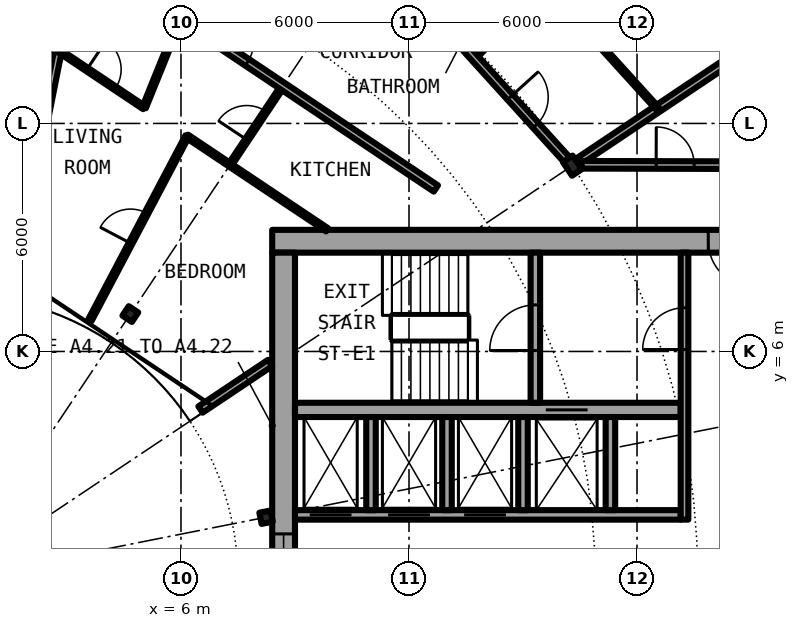
"""IFC4 building model, lengths in metres.
Left out: names, types, materials, properties, quantities, classifications, styles, units other than length and angle.
Written with IfcOpenShell. Run it as: python <this file> out.ifc"""

import sys

from ifc_helpers import new_model, si_unit, direction, frame, frame_2d, origin, origin_2d, place, context, subcontext, project, spatial, rectangle, i_section, extrude, element, fill, save


model = new_model("IFC4")
c1 = context("Model", 3, precision=1e-05, world=origin(), true_north=direction((0.0, 1.0)))
c2 = subcontext(c1, "Body", "Model", "MODEL_VIEW")
j1 = project(units=[si_unit("LENGTHUNIT", "METRE"), si_unit("PLANEANGLEUNIT", "RADIAN")], contexts=[c1])
p1 = place(None, origin())
s1 = spatial("IfcSite", under=j1, at=p1, CompositionType="ELEMENT")
p2 = place(p1, origin())
s2 = spatial("IfcBuilding", under=s1, at=p2, CompositionType="ELEMENT")
p3 = place(p2, frame((0.0, 0.0, 123.85)))
s3 = spatial("IfcBuildingStorey", under=s2, at=p3, CompositionType="ELEMENT", Elevation=123.85)
p4 = place(p3, frame((16.297, 10.889, 0.0), z_axis=(0.0, 0.0, 1.0), x_axis=(0.831469612303, 0.55557023302, 0.0)))
e1 = element("IfcColumn", 1, at=p4, inside=s3, PredefinedType="COLUMN", context=c2, shape_type="SweptSolid", body=[
    extrude(i_section(OverallWidth=0.307, OverallDepth=0.432, WebThickness=0.021, FlangeThickness=0.04, FilletRadius=0.027, at=origin_2d()), origin(), (0.0, 0.0, 1.0), 3.05),
])
for number, where, z_axis, x_axis in (
    (2, (8.239, 1.639, 0.0), (0.0, 0.0, 1.0), (0.981, 0.195, 0.0)),
    (3, (4.667, 6.984, 0.0), (0.0, 0.0, 1.0), (0.556, 0.831, 0.0)),
):
    element("IfcColumn", number, at=place(p3, frame(where, z_axis=z_axis, x_axis=x_axis)), inside=s3, PredefinedType="COLUMN", context=c2, shape_type="SweptSolid", body=[
        extrude(i_section(OverallWidth=0.3, OverallDepth=0.3, WebThickness=0.011, FlangeThickness=0.019, FilletRadius=0.027, at=origin_2d()), origin(), (0.0, 0.0, 1.0), 3.05),
    ])
p5 = place(p3, frame((22.2, 8.9, 0.0), z_axis=(0.0, 0.0, 1.0), x_axis=(-1.0, 0.0, 0.0)))
e4 = element("IfcWall", 4, at=p5, inside=s3, PredefinedType="SHEAR", context=c2, shape_type="SweptSolid", body=[
    extrude(rectangle(XDim=13.8, YDim=0.6, at=frame_2d((6.9, 0.0))), origin(), (0.0, 0.0, 1.0), 3.05),
])
p6 = place(p5, frame((1.125, 0.0, 0.0)))
e5 = element("IfcOpeningElement", 5, at=p6, cuts=e4, PredefinedType="OPENING", context=c2, shape_type="SweptSolid", body=[
    extrude(rectangle(XDim=1.2, YDim=2.3, at=frame_2d((0.6, 1.15))), frame((0.0, 0.31, 0.0), z_axis=(0.0, -1.0, 0.0), x_axis=(1.0, 0.0, 0.0)), (0.0, 0.0, 1.0), 0.62),
])
p7 = place(p3, frame((8.7, -8.6, 0.0), z_axis=(0.0, 0.0, 1.0), x_axis=(0.0, 1.0, 0.0)))
e6 = element("IfcWall", 6, at=p7, inside=s3, PredefinedType="SHEAR", context=c2, shape_type="SweptSolid", body=[
    extrude(rectangle(XDim=17.2, YDim=0.6, at=frame_2d((8.6, 0.0))), origin(), (0.0, 0.0, 1.0), 3.05),
])
p8 = place(p7, frame((7.4, 0.0, 0.1)))
e7 = element("IfcOpeningElement", 7, at=p8, cuts=e6, PredefinedType="OPENING", context=c2, shape_type="SweptSolid", body=[
    extrude(rectangle(XDim=2.4, YDim=2.2, at=frame_2d((1.2, 1.1))), frame((0.0, 0.31, 0.0), z_axis=(0.0, -1.0, 0.0), x_axis=(1.0, 0.0, 0.0)), (0.0, 0.0, 1.0), 0.62),
])
p9 = place(p3, frame((9.0, 1.7, 0.0), z_axis=(0.0, 0.0, 1.0), x_axis=(1.0, 0.0, 0.0)))
e8 = element("IfcWall", 8, at=p9, inside=s3, PredefinedType="SHEAR", context=c2, shape_type="SweptSolid", body=[
    extrude(rectangle(XDim=10.15, YDim=0.25, at=frame_2d((5.075, 0.0))), origin(), (0.0, 0.0, 1.0), 3.05),
])
p10 = place(p9, frame((0.387, 0.0, 0.0)))
e9 = element("IfcOpeningElement", 9, at=p10, cuts=e8, PredefinedType="OPENING", context=c2, shape_type="SweptSolid", body=[
    extrude(rectangle(XDim=1.1, YDim=2.3, at=frame_2d((0.55, 1.15))), frame((0.0, 0.135, 0.0), z_axis=(0.0, -1.0, 0.0), x_axis=(1.0, 0.0, 0.0)), (0.0, 0.0, 1.0), 0.27),
])
p11 = place(p9, frame((2.45, 0.0, 0.0)))
e10 = element("IfcOpeningElement", 10, at=p11, cuts=e8, PredefinedType="OPENING", context=c2, shape_type="SweptSolid", body=[
    extrude(rectangle(XDim=1.1, YDim=2.3, at=frame_2d((0.55, 1.15))), frame((0.0, 0.135, 0.0), z_axis=(0.0, -1.0, 0.0), x_axis=(1.0, 0.0, 0.0)), (0.0, 0.0, 1.0), 0.27),
])
p12 = place(p9, frame((4.45, 0.0, 0.0)))
e11 = element("IfcOpeningElement", 11, at=p12, cuts=e8, PredefinedType="OPENING", context=c2, shape_type="SweptSolid", body=[
    extrude(rectangle(XDim=1.1, YDim=2.3, at=frame_2d((0.55, 1.15))), frame((0.0, 0.135, 0.0), z_axis=(0.0, -1.0, 0.0), x_axis=(1.0, 0.0, 0.0)), (0.0, 0.0, 1.0), 0.27),
])
p13 = place(p3, frame((9.0, 4.462, 0.0), z_axis=(0.0, 0.0, 1.0), x_axis=(1.0, 0.0, 0.0)))
e12 = element("IfcWall", 12, at=p13, inside=s3, PredefinedType="SHEAR", context=c2, shape_type="SweptSolid", body=[
    extrude(rectangle(XDim=10.15, YDim=0.375, at=frame_2d((5.075, 0.0))), origin(), (0.0, 0.0, 1.0), 3.05),
])
p14 = place(p13, frame((6.6, 0.0, 0.0)))
e13 = element("IfcOpeningElement", 13, at=p14, cuts=e12, PredefinedType="OPENING", context=c2, shape_type="SweptSolid", body=[
    extrude(rectangle(XDim=1.1, YDim=2.3, at=frame_2d((0.55, 1.15))), frame((0.0, 0.198, 0.0), z_axis=(0.0, -1.0, 0.0), x_axis=(1.0, 0.0, 0.0)), (0.0, 0.0, 1.0), 0.395),
])
p15 = place(p3, frame((15.325, 4.65, 0.0), z_axis=(0.0, 0.0, 1.0), x_axis=(0.0, 1.0, 0.0)))
e14 = element("IfcWall", 14, at=p15, inside=s3, PredefinedType="SHEAR", context=c2, shape_type="SweptSolid", body=[
    extrude(rectangle(XDim=3.95, YDim=0.25, at=frame_2d((1.975, 0.0))), origin(), (0.0, 0.0, 1.0), 3.05),
])
p16 = place(p15, frame((1.375, 0.0, 0.0)))
e15 = element("IfcOpeningElement", 15, at=p16, cuts=e14, PredefinedType="OPENING", context=c2, shape_type="SweptSolid", body=[
    extrude(rectangle(XDim=1.2, YDim=2.3, at=frame_2d((0.6, 1.15))), frame((0.0, 0.135, 0.0), z_axis=(0.0, -1.0, 0.0), x_axis=(1.0, 0.0, 0.0)), (0.0, 0.0, 1.0), 0.27),
])
for number, where, z_axis, x_axis in (
    (16, (15.0, 1.825, 0.0), (0.0, 0.0, 1.0), (0.0, 1.0, 0.0)),
    (17, (17.3, 1.825, 0.0), (0.0, 0.0, 1.0), (0.0, 1.0, 0.0)),
):
    element("IfcWall", number, at=place(p3, frame(where, z_axis=z_axis, x_axis=x_axis)), inside=s3, PredefinedType="SOLIDWALL", context=c2, shape_type="SweptSolid", body=[
        extrude(rectangle(XDim=2.45, YDim=0.25, at=frame_2d((1.225, 0.0))), origin(), (0.0, 0.0, 1.0), 2.7),
    ])
p17 = place(p3, frame((19.25, 1.575, 0.0), z_axis=(0.0, 0.0, 1.0), x_axis=(0.0, 1.0, 0.0)))
e18 = element("IfcWall", 18, at=p17, inside=s3, PredefinedType="SOLIDWALL", context=c2, shape_type="SweptSolid", body=[
    extrude(rectangle(XDim=7.025, YDim=0.2, at=frame_2d((3.513, 0.0))), origin(), (0.0, 0.0, 1.0), 2.7),
])
p18 = place(p17, frame((4.475, 0.0, 0.0)))
e19 = element("IfcOpeningElement", 19, at=p18, cuts=e18, PredefinedType="OPENING", context=c2, shape_type="SweptSolid", body=[
    extrude(rectangle(XDim=1.1, YDim=2.3, at=frame_2d((0.55, 1.15))), frame((0.0, 0.11, 0.0), z_axis=(0.0, -1.0, 0.0), x_axis=(1.0, 0.0, 0.0)), (0.0, 0.0, 1.0), 0.22),
])
for number, where, z_axis, x_axis in (
    (20, (11.0, 1.825, 0.0), (0.0, 0.0, 1.0), (0.0, 1.0, 0.0)),
    (21, (13.0, 1.825, 0.0), (0.0, 0.0, 1.0), (0.0, 1.0, 0.0)),
):
    element("IfcWall", number, at=place(p3, frame(where, z_axis=z_axis, x_axis=x_axis)), inside=s3, PredefinedType="SOLIDWALL", context=c2, shape_type="SweptSolid", body=[
        extrude(rectangle(XDim=2.45, YDim=0.25, at=frame_2d((1.225, 0.0))), origin(), (0.0, 0.0, 1.0), 2.7),
    ])
p19 = place(p3, frame((1.503, 7.573, 0.0), z_axis=(0.0, 0.0, 1.0), x_axis=(0.194908854522, 0.980821359081, 0.0)))
e22 = element("IfcWall", 22, at=p19, inside=s3, PredefinedType="PARTITIONING", context=c2, shape_type="SweptSolid", body=[
    extrude(rectangle(XDim=9.179, YDim=0.2, at=frame_2d((4.589, 0.0))), origin(), (0.0, 0.0, 1.0), 2.7),
])
p20 = place(p3, frame((3.606, 6.827, 0.0), z_axis=(0.0, 0.0, 1.0), x_axis=(0.466976820365, 0.884269556889, 0.0)))
e23 = element("IfcWall", 23, at=p20, inside=s3, PredefinedType="PARTITIONING", context=c2, shape_type="SweptSolid", body=[
    extrude(rectangle(XDim=5.469, YDim=0.1, at=frame_2d((2.735, 0.0))), origin(), (0.0, 0.0, 1.0), 2.7),
])
p21 = place(p20, frame((2.284, 0.0, 0.0)))
e24 = element("IfcOpeningElement", 24, at=p21, cuts=e23, PredefinedType="OPENING", context=c2, shape_type="SweptSolid", body=[
    extrude(rectangle(XDim=0.9, YDim=2.3, at=frame_2d((0.45, 1.15))), frame((0.0, 0.06, 0.0), z_axis=(0.0, -1.0, 0.0), x_axis=(1.0, 0.0, 0.0)), (0.0, 0.0, 1.0), 0.12),
])
p22 = place(p3, frame((5.029, 12.418, 0.0), z_axis=(0.0, 0.0, 1.0), x_axis=(0.375649498413, 0.926761811008, 0.0)))
e25 = element("IfcWall", 25, at=p22, inside=s3, PredefinedType="PARTITIONING", context=c2, shape_type="SweptSolid", body=[
    extrude(rectangle(XDim=2.548, YDim=0.1, at=frame_2d((1.274, 0.0))), origin(), (0.0, 0.0, 1.0), 2.7),
])
p23 = place(p3, frame((7.289, 10.908, 0.0), z_axis=(0.0, 0.0, 1.0), x_axis=(0.555355163998, 0.831613276602, 0.0)))
e26 = element("IfcWall", 26, at=p23, inside=s3, PredefinedType="PARTITIONING", context=c2, shape_type="SweptSolid", body=[
    extrude(rectangle(XDim=2.494, YDim=0.1, at=frame_2d((1.247, 0.0))), origin(), (0.0, 0.0, 1.0), 2.7),
])
p24 = place(p23, frame((0.797, 0.0, 0.0)))
e27 = element("IfcOpeningElement", 27, at=p24, cuts=e26, PredefinedType="OPENING", context=c2, shape_type="SweptSolid", body=[
    extrude(rectangle(XDim=0.9, YDim=2.3, at=frame_2d((0.45, 1.15))), frame((0.0, 0.06, 0.0), z_axis=(0.0, -1.0, 0.0), x_axis=(1.0, 0.0, 0.0)), (0.0, 0.0, 1.0), 0.12),
])
p25 = place(p3, frame((13.722, 13.73, 0.0), z_axis=(0.0, 0.0, 1.0), x_axis=(0.706741540154, 0.707471833659, 0.0)))
e28 = element("IfcWall", 28, at=p25, inside=s3, PredefinedType="PARTITIONING", context=c2, shape_type="SweptSolid", body=[
    extrude(rectangle(XDim=2.674, YDim=0.1, at=frame_2d((1.337, 0.0))), origin(), (0.0, 0.0, 1.0), 2.7),
])
p26 = place(p25, frame((0.887, 0.0, 0.0)))
e29 = element("IfcOpeningElement", 29, at=p26, cuts=e28, PredefinedType="OPENING", context=c2, shape_type="SweptSolid", body=[
    extrude(rectangle(XDim=0.9, YDim=2.3, at=frame_2d((0.45, 1.15))), frame((0.0, 0.06, 0.0), z_axis=(0.0, -1.0, 0.0), x_axis=(1.0, 0.0, 0.0)), (0.0, 0.0, 1.0), 0.12),
])
p27 = place(p3, frame((16.477, 11.009, 0.0), z_axis=(0.0, 0.0, 1.0), x_axis=(0.831406593008, 0.555664536482, 0.0)))
e30 = element("IfcWall", 30, at=p27, inside=s3, PredefinedType="PARTITIONING", context=c2, shape_type="SweptSolid", body=[
    extrude(rectangle(XDim=7.358, YDim=0.2, at=frame_2d((3.679, 0.0))), origin(), (0.0, 0.0, 1.0), 2.7),
])
p28 = place(p3, frame((6.513, 4.472, 0.0), z_axis=(0.0, 0.0, 1.0), x_axis=(0.831333375071, 0.555774072347, 0.0)))
e31 = element("IfcWall", 31, at=p28, inside=s3, PredefinedType="PARTITIONING", context=c2, shape_type="SweptSolid", body=[
    extrude(rectangle(XDim=2.203, YDim=0.2, at=frame_2d((1.101, 0.0))), origin(), (0.0, 0.0, 1.0), 2.7),
])
p29 = place(p3, frame((16.541, 10.912, 0.0), z_axis=(0.0, 0.0, 1.0), x_axis=(0.999997173357, -0.002377662213, 0.0)))
e32 = element("IfcWall", 32, at=p29, inside=s3, PredefinedType="PARTITIONING", context=c2, shape_type="SweptSolid", body=[
    extrude(rectangle(XDim=5.134, YDim=0.2, at=frame_2d((2.567, 0.0))), origin(), (0.0, 0.0, 1.0), 2.7),
])
p30 = place(p29, frame((1.963, 0.0, 0.0)))
e33 = element("IfcOpeningElement", 33, at=p30, cuts=e32, PredefinedType="OPENING", context=c2, shape_type="SweptSolid", body=[
    extrude(rectangle(XDim=1.0, YDim=2.3, at=frame_2d((0.5, 1.15))), frame((0.0, 0.11, 0.0), z_axis=(0.0, -1.0, 0.0), x_axis=(1.0, 0.0, 0.0)), (0.0, 0.0, 1.0), 0.22),
])
p31 = place(p3, frame((2.771, 13.926, 0.0), z_axis=(0.0, 0.0, 1.0), x_axis=(0.831538390496, -0.555467285384, 0.0)))
e34 = element("IfcWall", 34, at=p31, inside=s3, PredefinedType="PARTITIONING", context=c2, shape_type="SweptSolid", body=[
    extrude(rectangle(XDim=2.717, YDim=0.1, at=frame_2d((1.358, 0.0))), origin(), (0.0, 0.0, 1.0), 2.7),
])
p32 = place(p31, frame((0.907, 0.0, 0.0)))
e35 = element("IfcOpeningElement", 35, at=p32, cuts=e34, PredefinedType="OPENING", context=c2, shape_type="SweptSolid", body=[
    extrude(rectangle(XDim=0.9, YDim=2.3, at=frame_2d((0.45, 1.15))), frame((0.0, 0.06, 0.0), z_axis=(0.0, -1.0, 0.0), x_axis=(1.0, 0.0, 0.0)), (0.0, 0.0, 1.0), 0.12),
])
p33 = place(p3, frame((6.159, 11.663, 0.0), z_axis=(0.0, 0.0, 1.0), x_axis=(0.831448270228, -0.555602172363, 0.0)))
e36 = element("IfcWall", 36, at=p33, inside=s3, PredefinedType="PARTITIONING", context=c2, shape_type="SweptSolid", body=[
    extrude(rectangle(XDim=4.433, YDim=0.1, at=frame_2d((2.217, 0.0))), origin(), (0.0, 0.0, 1.0), 2.7),
])
p34 = place(p3, frame((0.013, 13.791, 0.0), z_axis=(0.0, 0.0, 1.0), x_axis=(0.99880320044, 0.048909782152, 0.0)))
e37 = element("IfcWall", 37, at=p34, inside=s3, PredefinedType="PARTITIONING", context=c2, shape_type="SweptSolid", body=[
    extrude(rectangle(XDim=2.76, YDim=0.1, at=frame_2d((1.38, 0.0))), origin(), (0.0, 0.0, 1.0), 2.7),
])
p35 = place(p34, frame((0.93, 0.0, 0.0)))
e38 = element("IfcOpeningElement", 38, at=p35, cuts=e37, PredefinedType="OPENING", context=c2, shape_type="SweptSolid", body=[
    extrude(rectangle(XDim=0.9, YDim=2.3, at=frame_2d((0.45, 1.15))), frame((0.0, 0.06, 0.0), z_axis=(0.0, -1.0, 0.0), x_axis=(1.0, 0.0, 0.0)), (0.0, 0.0, 1.0), 0.12),
])
p36 = place(p3, frame((3.3, 16.574, 0.0), z_axis=(0.0, 0.0, 1.0), x_axis=(0.831455567902, -0.555591251376, 0.0)))
e39 = element("IfcWall", 39, at=p36, inside=s3, PredefinedType="PARTITIONING", context=c2, shape_type="SweptSolid", body=[
    extrude(rectangle(XDim=11.314, YDim=0.2, at=frame_2d((5.657, 0.0))), origin(), (0.0, 0.0, 1.0), 2.7),
])
p37 = place(p36, frame((4.346, 0.0, 0.0)))
e40 = element("IfcOpeningElement", 40, at=p37, cuts=e39, PredefinedType="OPENING", context=c2, shape_type="SweptSolid", body=[
    extrude(rectangle(XDim=1.0, YDim=2.3, at=frame_2d((0.5, 1.15))), frame((0.0, 0.11, 0.0), z_axis=(0.0, -1.0, 0.0), x_axis=(1.0, 0.0, 0.0)), (0.0, 0.0, 1.0), 0.22),
])
p38 = place(p3, frame((12.434, 15.151, 0.0), z_axis=(0.0, 0.0, 1.0), x_axis=(0.671481997275, -0.741020868354, 0.0)))
e41 = element("IfcWall", 41, at=p38, inside=s3, PredefinedType="PARTITIONING", context=c2, shape_type="SweptSolid", body=[
    extrude(rectangle(XDim=5.596, YDim=0.2, at=frame_2d((2.798, 0.0))), origin(), (0.0, 0.0, 1.0), 2.39),
])
p39 = place(p38, frame((3.319, 0.0, 0.0)))
e42 = element("IfcOpeningElement", 42, at=p39, cuts=e41, PredefinedType="OPENING", context=c2, shape_type="SweptSolid", body=[
    extrude(rectangle(XDim=1.0, YDim=2.3, at=frame_2d((0.5, 1.15))), frame((0.0, 0.11, 0.0), z_axis=(0.0, -1.0, 0.0), x_axis=(1.0, 0.0, 0.0)), (0.0, 0.0, 1.0), 0.22),
])
p40 = place(p3, frame((17.072, 14.011, 0.0), z_axis=(0.0, 0.0, 1.0), x_axis=(0.67169789574, -0.740825172937, 0.0)))
e43 = element("IfcWall", 43, at=p40, inside=s3, PredefinedType="PARTITIONING", context=c2, shape_type="SweptSolid", body=[
    extrude(rectangle(XDim=2.183, YDim=0.1, at=frame_2d((1.091, 0.0))), origin(), (0.0, 0.0, 1.0), 2.7),
])
p41 = place(p10, origin())
e44 = element("IfcDoor", 44, at=p41, inside=s3, OperationType="DOUBLE_DOOR_SLIDING", PredefinedType="DOOR", context=c2, shape_type="SweptSolid", body=[
    extrude(rectangle(XDim=1.1, YDim=2.3, at=frame_2d((0.55, 1.15))), frame((0.0, 0.025, 0.0), z_axis=(0.0, -1.0, 0.0), x_axis=(1.0, 0.0, 0.0)), (0.0, 0.0, 1.0), 0.05),
])
fill(e9, e44)
p42 = place(p11, origin())
e45 = element("IfcDoor", 45, at=p42, inside=s3, OperationType="DOUBLE_DOOR_SLIDING", PredefinedType="DOOR", context=c2, shape_type="SweptSolid", body=[
    extrude(rectangle(XDim=1.1, YDim=2.3, at=frame_2d((0.55, 1.15))), frame((0.0, 0.025, 0.0), z_axis=(0.0, -1.0, 0.0), x_axis=(1.0, 0.0, 0.0)), (0.0, 0.0, 1.0), 0.05),
])
fill(e10, e45)
p43 = place(p12, origin())
e46 = element("IfcDoor", 46, at=p43, inside=s3, OperationType="DOUBLE_DOOR_SLIDING", PredefinedType="DOOR", context=c2, shape_type="SweptSolid", body=[
    extrude(rectangle(XDim=1.1, YDim=2.3, at=frame_2d((0.55, 1.15))), frame((0.0, 0.025, 0.0), z_axis=(0.0, -1.0, 0.0), x_axis=(1.0, 0.0, 0.0)), (0.0, 0.0, 1.0), 0.05),
])
fill(e11, e46)
p44 = place(p14, origin())
e47 = element("IfcDoor", 47, at=p44, inside=s3, OperationType="DOUBLE_DOOR_SLIDING", PredefinedType="DOOR", context=c2, shape_type="SweptSolid", body=[
    extrude(rectangle(XDim=1.1, YDim=2.3, at=frame_2d((0.55, 1.15))), frame((0.0, 0.025, 0.0), z_axis=(0.0, -1.0, 0.0), x_axis=(1.0, 0.0, 0.0)), (0.0, 0.0, 1.0), 0.05),
])
fill(e13, e47)
p45 = place(p16, origin())
e48 = element("IfcDoor", 48, at=p45, inside=s3, OperationType="SINGLE_SWING_LEFT", PredefinedType="DOOR", context=c2, shape_type="SweptSolid", body=[
    extrude(rectangle(XDim=1.2, YDim=2.3, at=frame_2d((0.6, 1.15))), frame((0.0, 0.025, 0.0), z_axis=(0.0, -1.0, 0.0), x_axis=(1.0, 0.0, 0.0)), (0.0, 0.0, 1.0), 0.05),
])
fill(e15, e48)
p46 = place(p18, origin())
e49 = element("IfcDoor", 49, at=p46, inside=s3, OperationType="SINGLE_SWING_LEFT", PredefinedType="DOOR", context=c2, shape_type="SweptSolid", body=[
    extrude(rectangle(XDim=1.1, YDim=2.3, at=frame_2d((0.55, 1.15))), frame((0.0, 0.025, 0.0), z_axis=(0.0, -1.0, 0.0), x_axis=(1.0, 0.0, 0.0)), (0.0, 0.0, 1.0), 0.05),
])
fill(e19, e49)
p47 = place(p6, origin())
e50 = element("IfcDoor", 50, at=p47, inside=s3, OperationType="SINGLE_SWING_RIGHT", PredefinedType="DOOR", context=c2, shape_type="SweptSolid", body=[
    extrude(rectangle(XDim=1.2, YDim=2.3, at=frame_2d((0.6, 1.15))), frame((0.0, 0.025, 0.0), z_axis=(0.0, -1.0, 0.0), x_axis=(1.0, 0.0, 0.0)), (0.0, 0.0, 1.0), 0.05),
])
fill(e5, e50)
p48 = place(p8, origin())
e51 = element("IfcWindow", 51, at=p48, inside=s3, PartitioningType="SINGLE_PANEL", PredefinedType="WINDOW", context=c2, shape_type="SweptSolid", body=[
    extrude(rectangle(XDim=2.4, YDim=2.2, at=frame_2d((1.2, 1.1))), frame((0.0, 0.03, 0.0), z_axis=(0.0, -1.0, 0.0), x_axis=(1.0, 0.0, 0.0)), (0.0, 0.0, 1.0), 0.06),
])
fill(e7, e51)
p49 = place(p39, origin())
e52 = element("IfcDoor", 52, at=p49, inside=s3, OperationType="SINGLE_SWING_RIGHT", PredefinedType="DOOR", context=c2, shape_type="SweptSolid", body=[
    extrude(rectangle(XDim=1.0, YDim=2.3, at=frame_2d((0.5, 1.15))), frame((0.0, 0.025, 0.0), z_axis=(0.0, -1.0, 0.0), x_axis=(1.0, 0.0, 0.0)), (0.0, 0.0, 1.0), 0.05),
])
fill(e42, e52)
p50 = place(p37, origin())
e53 = element("IfcDoor", 53, at=p50, inside=s3, OperationType="SINGLE_SWING_LEFT", PredefinedType="DOOR", context=c2, shape_type="SweptSolid", body=[
    extrude(rectangle(XDim=1.0, YDim=2.3, at=frame_2d((0.5, 1.15))), frame((0.0, 0.025, 0.0), z_axis=(0.0, -1.0, 0.0), x_axis=(1.0, 0.0, 0.0)), (0.0, 0.0, 1.0), 0.05),
])
fill(e40, e53)
p51 = place(p32, origin())
e54 = element("IfcDoor", 54, at=p51, inside=s3, OperationType="SINGLE_SWING_LEFT", PredefinedType="DOOR", context=c2, shape_type="SweptSolid", body=[
    extrude(rectangle(XDim=0.9, YDim=2.3, at=frame_2d((0.45, 1.15))), frame((0.0, 0.025, 0.0), z_axis=(0.0, -1.0, 0.0), x_axis=(1.0, 0.0, 0.0)), (0.0, 0.0, 1.0), 0.05),
])
fill(e35, e54)
p52 = place(p24, origin())
e55 = element("IfcDoor", 55, at=p52, inside=s3, OperationType="SINGLE_SWING_RIGHT", PredefinedType="DOOR", context=c2, shape_type="SweptSolid", body=[
    extrude(rectangle(XDim=0.9, YDim=2.3, at=frame_2d((0.45, 1.15))), frame((0.0, 0.025, 0.0), z_axis=(0.0, -1.0, 0.0), x_axis=(1.0, 0.0, 0.0)), (0.0, 0.0, 1.0), 0.05),
])
fill(e27, e55)
p53 = place(p21, origin())
e56 = element("IfcDoor", 56, at=p53, inside=s3, OperationType="SINGLE_SWING_LEFT", PredefinedType="DOOR", context=c2, shape_type="SweptSolid", body=[
    extrude(rectangle(XDim=0.9, YDim=2.3, at=frame_2d((0.45, 1.15))), frame((0.0, 0.025, 0.0), z_axis=(0.0, -1.0, 0.0), x_axis=(1.0, 0.0, 0.0)), (0.0, 0.0, 1.0), 0.05),
])
fill(e24, e56)
p54 = place(p30, origin())
e57 = element("IfcDoor", 57, at=p54, inside=s3, OperationType="SINGLE_SWING_LEFT", PredefinedType="DOOR", context=c2, shape_type="SweptSolid", body=[
    extrude(rectangle(XDim=1.0, YDim=2.3, at=frame_2d((0.5, 1.15))), frame((0.0, 0.025, 0.0), z_axis=(0.0, -1.0, 0.0), x_axis=(1.0, 0.0, 0.0)), (0.0, 0.0, 1.0), 0.05),
])
fill(e33, e57)
save(model, sys.argv[1])
